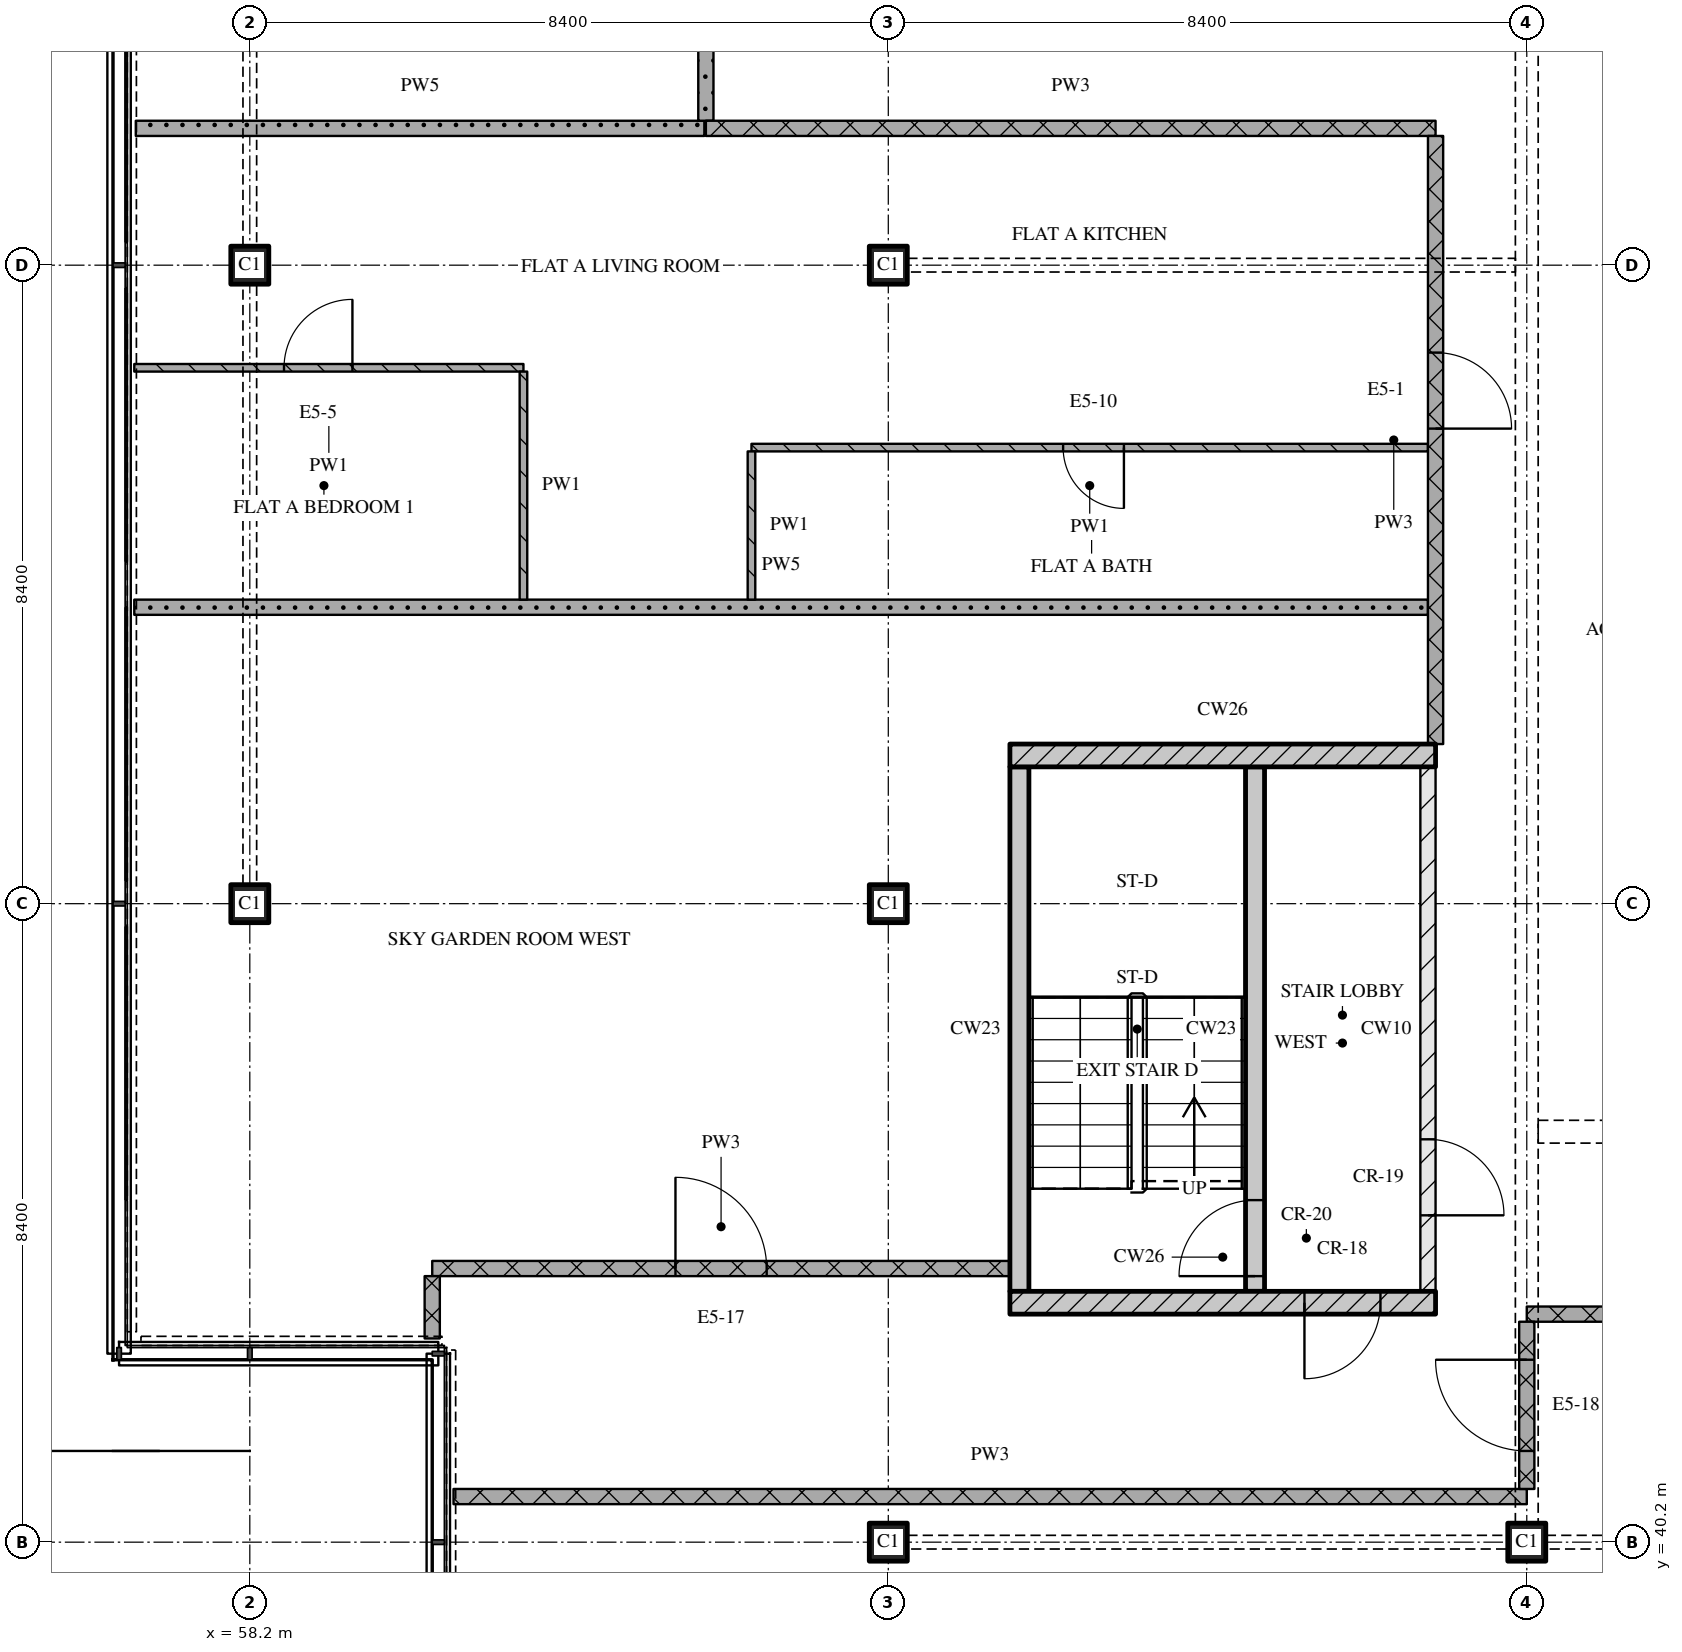
"""IFC4 building model, lengths in metres.
Left out: names, types, materials, properties, quantities, classifications, styles, units other than length and angle.
Written with IfcOpenShell. Run it as: python <this file> out.ifc"""

import sys

from ifc_helpers import new_model, si_unit, direction, frame, frame_2d, origin, origin_2d, place, context, subcontext, project, spatial, rectangle, extrude, element, fill, save


model = new_model("IFC4")
c1 = context("Model", 3, precision=1e-05, world=origin(), true_north=direction((0.0, 1.0)))
c2 = subcontext(c1, "Body", "Model", "MODEL_VIEW")
j1 = project(units=[si_unit("LENGTHUNIT", "METRE"), si_unit("PLANEANGLEUNIT", "RADIAN")], contexts=[c1])
p1 = place(None, origin())
s1 = spatial("IfcSite", under=j1, at=p1, CompositionType="ELEMENT")
p2 = place(p1, origin())
s2 = spatial("IfcBuilding", under=s1, at=p2, CompositionType="ELEMENT")
p3 = place(p2, frame((0.0, 0.0, 292.35)))
s3 = spatial("IfcBuildingStorey", under=s2, at=p3, CompositionType="ELEMENT", Elevation=292.35)
for number, where, z_axis, x_axis in (
    (1, (58.2, 48.6, 0.0), (0.0, 0.0, 1.0), (1.0, 0.0, 0.0)),
    (2, (58.2, 57.0, 0.0), (0.0, 0.0, 1.0), (1.0, 0.0, 0.0)),
    (3, (66.6, 40.2, 0.0), (0.0, 0.0, 1.0), (1.0, 0.0, 0.0)),
    (4, (66.6, 48.6, 0.0), (0.0, 0.0, 1.0), (1.0, 0.0, 0.0)),
    (5, (66.6, 57.0, 0.0), (0.0, 0.0, 1.0), (1.0, 0.0, 0.0)),
    (6, (75.0, 40.2, 0.0), (0.0, 0.0, 1.0), (1.0, 0.0, 0.0)),
):
    element("IfcColumn", number, at=place(p3, frame(where, z_axis=z_axis, x_axis=x_axis)), inside=s3, PredefinedType="COLUMN", context=c2, shape_type="SweptSolid", body=[
        extrude(rectangle(XDim=0.5, YDim=0.5, at=origin_2d()), origin(), (0.0, 0.0, 1.0), 3.6),
    ])
p4 = place(p3, frame((68.2, 43.35, 0.0), z_axis=(0.0, 0.0, 1.0), x_axis=(1.0, 0.0, 0.0)))
e7 = element("IfcWall", 7, at=p4, inside=s3, PredefinedType="SOLIDWALL", context=c2, shape_type="SweptSolid", body=[
    extrude(rectangle(XDim=5.6, YDim=0.3, at=frame_2d((2.8, 0.0))), origin(), (0.0, 0.0, 1.0), 3.32),
])
p5 = place(p4, frame((3.875, 0.0, 0.0)))
e8 = element("IfcOpeningElement", 8, at=p5, cuts=e7, PredefinedType="OPENING", context=c2, shape_type="SweptSolid", body=[
    extrude(rectangle(XDim=1.0, YDim=2.1, at=frame_2d((0.5, 1.05))), frame((0.0, 0.16, 0.0), z_axis=(0.0, -1.0, 0.0), x_axis=(1.0, 0.0, 0.0)), (0.0, 0.0, 1.0), 0.32),
])
p6 = place(p3, frame((68.325, 43.5, 0.0), z_axis=(0.0, 0.0, 1.0), x_axis=(0.0, 1.0, 0.0)))
e9 = element("IfcWall", 9, at=p6, inside=s3, PredefinedType="SOLIDWALL", context=c2, shape_type="SweptSolid", body=[
    extrude(rectangle(XDim=6.9, YDim=0.25, at=frame_2d((3.45, 0.0))), origin(), (0.0, 0.0, 1.0), 3.32),
])
p7 = place(p3, frame((71.425, 43.5, 0.0), z_axis=(0.0, 0.0, 1.0), x_axis=(0.0, 1.0, 0.0)))
e10 = element("IfcWall", 10, at=p7, inside=s3, PredefinedType="SOLIDWALL", context=c2, shape_type="SweptSolid", body=[
    extrude(rectangle(XDim=6.9, YDim=0.25, at=frame_2d((3.45, 0.0))), origin(), (0.0, 0.0, 1.0), 3.32),
])
p8 = place(p7, frame((0.2, 0.0, 0.0)))
e11 = element("IfcOpeningElement", 11, at=p8, cuts=e10, PredefinedType="OPENING", context=c2, shape_type="SweptSolid", body=[
    extrude(rectangle(XDim=1.0, YDim=2.1, at=frame_2d((0.5, 1.05))), frame((0.0, 0.135, 0.0), z_axis=(0.0, -1.0, 0.0), x_axis=(1.0, 0.0, 0.0)), (0.0, 0.0, 1.0), 0.27),
])
p9 = place(p3, frame((73.7, 43.5, 0.0), z_axis=(0.0, 0.0, 1.0), x_axis=(0.0, 1.0, 0.0)))
e12 = element("IfcWall", 12, at=p9, inside=s3, PredefinedType="PARTITIONING", context=c2, shape_type="SweptSolid", body=[
    extrude(rectangle(XDim=6.9, YDim=0.2, at=frame_2d((3.45, 0.0))), origin(), (0.0, 0.0, 1.0), 3.32),
])
p10 = place(p9, frame((1.0, 0.0, 0.0)))
e13 = element("IfcOpeningElement", 13, at=p10, cuts=e12, PredefinedType="OPENING", context=c2, shape_type="SweptSolid", body=[
    extrude(rectangle(XDim=1.0, YDim=2.1, at=frame_2d((0.5, 1.05))), frame((0.0, 0.11, 0.0), z_axis=(0.0, -1.0, 0.0), x_axis=(1.0, 0.0, 0.0)), (0.0, 0.0, 1.0), 0.22),
])
p11 = place(p3, frame((68.2, 50.55, 0.0), z_axis=(0.0, 0.0, 1.0), x_axis=(1.0, 0.0, 0.0)))
e14 = element("IfcWall", 14, at=p11, inside=s3, PredefinedType="SOLIDWALL", context=c2, shape_type="SweptSolid", body=[
    extrude(rectangle(XDim=5.6, YDim=0.3, at=frame_2d((2.8, 0.0))), origin(), (0.0, 0.0, 1.0), 3.32),
])
p12 = place(p3, frame((60.88, 40.8, 0.0), z_axis=(0.0, 0.0, 1.0), x_axis=(1.0, 0.0, 0.0)))
e15 = element("IfcWall", 15, at=p12, inside=s3, PredefinedType="PARTITIONING", context=c2, shape_type="SweptSolid", body=[
    extrude(rectangle(XDim=14.12, YDim=0.2, at=frame_2d((7.06, 0.0))), origin(), (0.0, 0.0, 1.0), 3.32),
])
p13 = place(p3, frame((100.2, 43.2, 0.0), z_axis=(0.0, 0.0, 1.0), x_axis=(-1.0, 0.0, 0.0)))
e16 = element("IfcWall", 16, at=p13, inside=s3, PredefinedType="PARTITIONING", context=c2, shape_type="SweptSolid", body=[
    extrude(rectangle(XDim=25.2, YDim=0.2, at=frame_2d((12.6, 0.0))), origin(), (0.0, 0.0, 1.0), 3.32),
])
p14 = place(p13, frame((12.0, 0.0, 0.0)))
e17 = element("IfcOpeningElement", 17, at=p14, cuts=e16, PredefinedType="OPENING", context=c2, shape_type="SweptSolid", body=[
    extrude(rectangle(XDim=1.2, YDim=2.1, at=frame_2d((0.6, 1.05))), frame((0.0, 0.11, 0.0), z_axis=(0.0, -1.0, 0.0), x_axis=(1.0, 0.0, 0.0)), (0.0, 0.0, 1.0), 0.22),
])
p15 = place(p3, frame((60.6, 43.8, 0.0), z_axis=(0.0, 0.0, 1.0), x_axis=(1.0, 0.0, 0.0)))
e18 = element("IfcWall", 18, at=p15, inside=s3, PredefinedType="PARTITIONING", context=c2, shape_type="SweptSolid", body=[
    extrude(rectangle(XDim=7.6, YDim=0.2, at=frame_2d((3.8, 0.0))), origin(), (0.0, 0.0, 1.0), 3.32),
])
p16 = place(p15, frame((3.2, 0.0, 0.0)))
e19 = element("IfcOpeningElement", 19, at=p16, cuts=e18, PredefinedType="OPENING", context=c2, shape_type="SweptSolid", body=[
    extrude(rectangle(XDim=1.2, YDim=2.1, at=frame_2d((0.6, 1.05))), frame((0.0, 0.11, 0.0), z_axis=(0.0, -1.0, 0.0), x_axis=(1.0, 0.0, 0.0)), (0.0, 0.0, 1.0), 0.22),
])
p17 = place(p3, frame((56.68, 52.5, 0.0), z_axis=(0.0, 0.0, 1.0), x_axis=(1.0, 0.0, 0.0)))
e20 = element("IfcWall", 20, at=p17, inside=s3, PredefinedType="PARTITIONING", context=c2, shape_type="SweptSolid", body=[
    extrude(rectangle(XDim=17.02, YDim=0.2, at=frame_2d((8.51, 0.0))), origin(), (0.0, 0.0, 1.0), 3.32),
])
p18 = place(p3, frame((73.7, 54.6, 0.0), z_axis=(0.0, 0.0, 1.0), x_axis=(-1.0, 0.0, 0.0)))
e21 = element("IfcWall", 21, at=p18, inside=s3, PredefinedType="PARTITIONING", context=c2, shape_type="SweptSolid", body=[
    extrude(rectangle(XDim=8.9, YDim=0.1, at=frame_2d((4.45, 0.0))), origin(), (0.0, 0.0, 1.0), 3.32),
])
p19 = place(p18, frame((4.0, 0.0, 0.0)))
e22 = element("IfcOpeningElement", 22, at=p19, cuts=e21, PredefinedType="OPENING", context=c2, shape_type="SweptSolid", body=[
    extrude(rectangle(XDim=0.8, YDim=2.1, at=frame_2d((0.4, 1.05))), frame((0.0, 0.06, 0.0), z_axis=(0.0, -1.0, 0.0), x_axis=(1.0, 0.0, 0.0)), (0.0, 0.0, 1.0), 0.12),
])
p20 = place(p3, frame((61.8, 55.65, 0.0), z_axis=(0.0, 0.0, 1.0), x_axis=(-1.0, 0.0, 0.0)))
e23 = element("IfcWall", 23, at=p20, inside=s3, PredefinedType="PARTITIONING", context=c2, shape_type="SweptSolid", body=[
    extrude(rectangle(XDim=5.12, YDim=0.1, at=frame_2d((2.56, 0.0))), origin(), (0.0, 0.0, 1.0), 3.32),
])
p21 = place(p20, frame((2.25, 0.0, 0.0)))
e24 = element("IfcOpeningElement", 24, at=p21, cuts=e23, PredefinedType="OPENING", context=c2, shape_type="SweptSolid", body=[
    extrude(rectangle(XDim=0.9, YDim=2.1, at=frame_2d((0.45, 1.05))), frame((0.0, 0.06, 0.0), z_axis=(0.0, -1.0, 0.0), x_axis=(1.0, 0.0, 0.0)), (0.0, 0.0, 1.0), 0.12),
])
p22 = place(p3, frame((64.2, 58.8, 0.0), z_axis=(0.0, 0.0, 1.0), x_axis=(1.0, 0.0, 0.0)))
e25 = element("IfcWall", 25, at=p22, inside=s3, PredefinedType="PARTITIONING", context=c2, shape_type="SweptSolid", body=[
    extrude(rectangle(XDim=9.6, YDim=0.2, at=frame_2d((4.8, 0.0))), origin(), (0.0, 0.0, 1.0), 3.32),
])
p23 = place(p3, frame((56.7, 58.8, 0.0), z_axis=(0.0, 0.0, 1.0), x_axis=(1.0, 0.0, 0.0)))
e26 = element("IfcWall", 26, at=p23, inside=s3, PredefinedType="PARTITIONING", context=c2, shape_type="SweptSolid", body=[
    extrude(rectangle(XDim=7.48, YDim=0.2, at=frame_2d((3.74, 0.0))), origin(), (0.0, 0.0, 1.0), 3.32),
])
p24 = place(p3, frame((60.6, 43.7, 0.0), z_axis=(0.0, 0.0, 1.0), x_axis=(0.0, -1.0, 0.0)))
e27 = element("IfcWall", 27, at=p24, inside=s3, PredefinedType="PARTITIONING", context=c2, shape_type="SweptSolid", body=[
    extrude(rectangle(XDim=0.82, YDim=0.2, at=frame_2d((0.41, 0.0))), origin(), (0.0, 0.0, 1.0), 3.32),
])
p25 = place(p3, frame((61.8, 55.6, 0.0), z_axis=(0.0, 0.0, 1.0), x_axis=(0.0, -1.0, 0.0)))
e28 = element("IfcWall", 28, at=p25, inside=s3, PredefinedType="PARTITIONING", context=c2, shape_type="SweptSolid", body=[
    extrude(rectangle(XDim=3.0, YDim=0.1, at=frame_2d((1.5, 0.0))), origin(), (0.0, 0.0, 1.0), 3.32),
])
p26 = place(p3, frame((64.2, 61.1, 0.0), z_axis=(0.0, 0.0, 1.0), x_axis=(0.0, -1.0, 0.0)))
e29 = element("IfcWall", 29, at=p26, inside=s3, PredefinedType="PARTITIONING", context=c2, shape_type="SweptSolid", body=[
    extrude(rectangle(XDim=2.2, YDim=0.2, at=frame_2d((1.1, 0.0))), origin(), (0.0, 0.0, 1.0), 3.32),
])
p27 = place(p3, frame((64.8, 54.55, 0.0), z_axis=(0.0, 0.0, 1.0), x_axis=(0.0, -1.0, 0.0)))
e30 = element("IfcWall", 30, at=p27, inside=s3, PredefinedType="PARTITIONING", context=c2, shape_type="SweptSolid", body=[
    extrude(rectangle(XDim=1.95, YDim=0.1, at=frame_2d((0.975, 0.0))), origin(), (0.0, 0.0, 1.0), 3.32),
])
p28 = place(p3, frame((73.8, 50.7, 0.0), z_axis=(0.0, 0.0, 1.0), x_axis=(0.0, 1.0, 0.0)))
e31 = element("IfcWall", 31, at=p28, inside=s3, PredefinedType="PARTITIONING", context=c2, shape_type="SweptSolid", body=[
    extrude(rectangle(XDim=8.0, YDim=0.2, at=frame_2d((4.0, 0.0))), origin(), (0.0, 0.0, 1.0), 3.32),
])
p29 = place(p28, frame((4.15, 0.0, 0.0)))
e32 = element("IfcOpeningElement", 32, at=p29, cuts=e31, PredefinedType="OPENING", context=c2, shape_type="SweptSolid", body=[
    extrude(rectangle(XDim=1.0, YDim=2.1, at=frame_2d((0.5, 1.05))), frame((0.0, 0.11, 0.0), z_axis=(0.0, -1.0, 0.0), x_axis=(1.0, 0.0, 0.0)), (0.0, 0.0, 1.0), 0.22),
])
p30 = place(p3, frame((75.0, 43.1, 0.0), z_axis=(0.0, 0.0, 1.0), x_axis=(0.0, -1.0, 0.0)))
e33 = element("IfcWall", 33, at=p30, inside=s3, PredefinedType="PARTITIONING", context=c2, shape_type="SweptSolid", body=[
    extrude(rectangle(XDim=2.2, YDim=0.2, at=frame_2d((1.1, 0.0))), origin(), (0.0, 0.0, 1.0), 2.53),
])
p31 = place(p30, frame((0.5, 0.0, 0.0)))
e34 = element("IfcOpeningElement", 34, at=p31, cuts=e33, PredefinedType="OPENING", context=c2, shape_type="SweptSolid", body=[
    extrude(rectangle(XDim=1.2, YDim=2.1, at=frame_2d((0.6, 1.05))), frame((0.0, 0.11, 0.0), z_axis=(0.0, -1.0, 0.0), x_axis=(1.0, 0.0, 0.0)), (0.0, 0.0, 1.0), 0.22),
])
p32 = place(p5, origin())
e35 = element("IfcDoor", 35, at=p32, inside=s3, OperationType="SINGLE_SWING_RIGHT", PredefinedType="DOOR", context=c2, shape_type="SweptSolid", body=[
    extrude(rectangle(XDim=1.0, YDim=2.1, at=frame_2d((0.5, 1.05))), frame((0.0, 0.025, 0.0), z_axis=(0.0, -1.0, 0.0), x_axis=(1.0, 0.0, 0.0)), (0.0, 0.0, 1.0), 0.05),
])
fill(e8, e35)
p33 = place(p8, origin())
e36 = element("IfcDoor", 36, at=p33, inside=s3, OperationType="SINGLE_SWING_LEFT", PredefinedType="DOOR", context=c2, shape_type="SweptSolid", body=[
    extrude(rectangle(XDim=1.0, YDim=2.1, at=frame_2d((0.5, 1.05))), frame((0.0, 0.025, 0.0), z_axis=(0.0, -1.0, 0.0), x_axis=(1.0, 0.0, 0.0)), (0.0, 0.0, 1.0), 0.05),
])
fill(e11, e36)
p34 = place(p10, origin())
e37 = element("IfcDoor", 37, at=p34, inside=s3, OperationType="SINGLE_SWING_RIGHT", PredefinedType="DOOR", context=c2, shape_type="SweptSolid", body=[
    extrude(rectangle(XDim=1.0, YDim=2.1, at=frame_2d((0.5, 1.05))), frame((0.0, 0.025, 0.0), z_axis=(0.0, -1.0, 0.0), x_axis=(1.0, 0.0, 0.0)), (0.0, 0.0, 1.0), 0.05),
])
fill(e13, e37)
p35 = place(p16, origin())
e38 = element("IfcDoor", 38, at=p35, inside=s3, OperationType="SINGLE_SWING_LEFT", PredefinedType="DOOR", context=c2, shape_type="SweptSolid", body=[
    extrude(rectangle(XDim=1.2, YDim=2.1, at=frame_2d((0.6, 1.05))), frame((0.0, 0.025, 0.0), z_axis=(0.0, -1.0, 0.0), x_axis=(1.0, 0.0, 0.0)), (0.0, 0.0, 1.0), 0.05),
])
fill(e19, e38)
p36 = place(p19, origin())
e39 = element("IfcDoor", 39, at=p36, inside=s3, OperationType="SINGLE_SWING_LEFT", PredefinedType="DOOR", context=c2, shape_type="SweptSolid", body=[
    extrude(rectangle(XDim=0.8, YDim=2.1, at=frame_2d((0.4, 1.05))), frame((0.0, 0.025, 0.0), z_axis=(0.0, -1.0, 0.0), x_axis=(1.0, 0.0, 0.0)), (0.0, 0.0, 1.0), 0.05),
])
fill(e22, e39)
p37 = place(p21, origin())
e40 = element("IfcDoor", 40, at=p37, inside=s3, OperationType="SINGLE_SWING_RIGHT", PredefinedType="DOOR", context=c2, shape_type="SweptSolid", body=[
    extrude(rectangle(XDim=0.9, YDim=2.1, at=frame_2d((0.45, 1.05))), frame((0.0, 0.025, 0.0), z_axis=(0.0, -1.0, 0.0), x_axis=(1.0, 0.0, 0.0)), (0.0, 0.0, 1.0), 0.05),
])
fill(e24, e40)
p38 = place(p29, origin())
e41 = element("IfcDoor", 41, at=p38, inside=s3, OperationType="SINGLE_SWING_RIGHT", PredefinedType="DOOR", context=c2, shape_type="SweptSolid", body=[
    extrude(rectangle(XDim=1.0, YDim=2.1, at=frame_2d((0.5, 1.05))), frame((0.0, 0.025, 0.0), z_axis=(0.0, -1.0, 0.0), x_axis=(1.0, 0.0, 0.0)), (0.0, 0.0, 1.0), 0.05),
])
fill(e32, e41)
p39 = place(p31, origin())
e42 = element("IfcDoor", 42, at=p39, inside=s3, OperationType="SINGLE_SWING_RIGHT", PredefinedType="DOOR", context=c2, shape_type="SweptSolid", body=[
    extrude(rectangle(XDim=1.2, YDim=2.1, at=frame_2d((0.6, 1.05))), frame((0.0, 0.025, 0.0), z_axis=(0.0, -1.0, 0.0), x_axis=(1.0, 0.0, 0.0)), (0.0, 0.0, 1.0), 0.05),
])
fill(e34, e42)
save(model, sys.argv[1])
